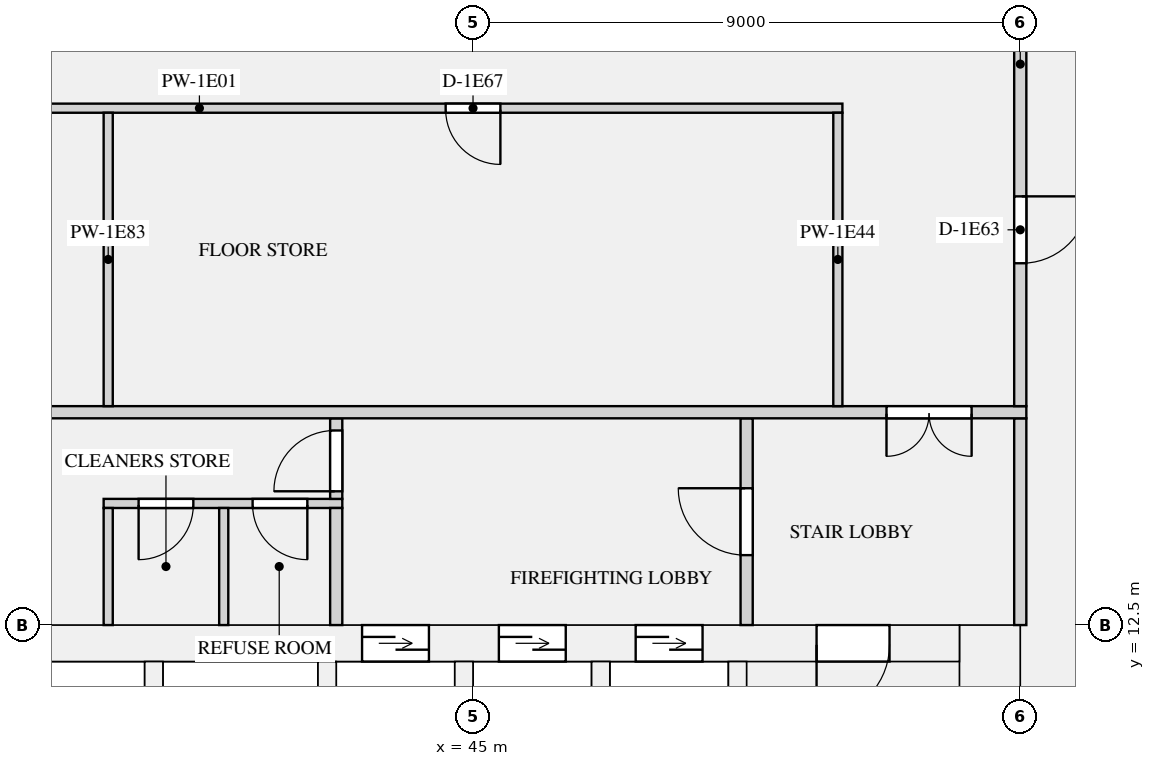
"""IFC4 building model, lengths in metres.
Left out: names, types, materials, properties, quantities, classifications, styles, units other than length and angle.
Written with IfcOpenShell. Run it as: python <this file> out.ifc"""

import sys

from ifc_helpers import new_model, si_unit, direction, frame, frame_2d, origin, place, context, subcontext, project, spatial, rectangle, extrude, element, fill, save


model = new_model("IFC4")
c1 = context("Model", 3, precision=1e-05, world=origin(), true_north=direction((0.0, 1.0)))
c2 = subcontext(c1, "Body", "Model", "MODEL_VIEW")
j1 = project(units=[si_unit("LENGTHUNIT", "METRE"), si_unit("PLANEANGLEUNIT", "RADIAN")], contexts=[c1])
p1 = place(None, origin())
s1 = spatial("IfcSite", under=j1, at=p1, CompositionType="ELEMENT")
p2 = place(p1, origin())
s2 = spatial("IfcBuilding", under=s1, at=p2, CompositionType="ELEMENT")
p3 = place(p2, frame((0.0, 0.0, 54.15)))
s3 = spatial("IfcBuildingStorey", under=s2, at=p3, CompositionType="ELEMENT", Elevation=54.15)
p4 = place(p3, frame((53.5, 0.0, 0.0), z_axis=(0.0, 0.0, 1.0), x_axis=(0.0, 1.0, 0.0)))
e1 = element("IfcWall", 1, at=p4, inside=s3, PredefinedType="SHEAR", context=c2, shape_type="SweptSolid", body=[
    extrude(rectangle(XDim=12.5, YDim=1.0, at=frame_2d((6.25, 0.0))), origin(), (0.0, 0.0, 1.0), 3.15),
])
p5 = place(p3, frame((19.0, 12.2, 0.0), z_axis=(0.0, 0.0, 1.0), x_axis=(1.0, 0.0, 0.0)))
e2 = element("IfcWall", 2, at=p5, inside=s3, PredefinedType="SHEAR", context=c2, shape_type="SweptSolid", body=[
    extrude(rectangle(XDim=34.0, YDim=0.6, at=frame_2d((17.0, 0.0))), origin(), (0.0, 0.0, 1.0), 3.15),
])
p6 = place(p5, frame((4.475, 0.0, 0.0)))
e3 = element("IfcOpeningElement", 3, at=p6, cuts=e2, PredefinedType="OPENING", context=c2, shape_type="SweptSolid", body=[
    extrude(rectangle(XDim=1.2, YDim=2.1, at=frame_2d((0.6, 1.05))), frame((0.0, 0.31, 0.0), z_axis=(0.0, -1.0, 0.0), x_axis=(1.0, 0.0, 0.0)), (0.0, 0.0, 1.0), 0.62),
])
p7 = place(p5, frame((7.325, 0.0, 0.0)))
e4 = element("IfcOpeningElement", 4, at=p7, cuts=e2, PredefinedType="OPENING", context=c2, shape_type="SweptSolid", body=[
    extrude(rectangle(XDim=1.2, YDim=2.1, at=frame_2d((0.6, 1.05))), frame((0.0, 0.31, 0.0), z_axis=(0.0, -1.0, 0.0), x_axis=(1.0, 0.0, 0.0)), (0.0, 0.0, 1.0), 0.62),
])
p8 = place(p5, frame((10.175, 0.0, 0.0)))
e5 = element("IfcOpeningElement", 5, at=p8, cuts=e2, PredefinedType="OPENING", context=c2, shape_type="SweptSolid", body=[
    extrude(rectangle(XDim=1.2, YDim=2.1, at=frame_2d((0.6, 1.05))), frame((0.0, 0.31, 0.0), z_axis=(0.0, -1.0, 0.0), x_axis=(1.0, 0.0, 0.0)), (0.0, 0.0, 1.0), 0.62),
])
p9 = place(p5, frame((13.025, 0.0, 0.0)))
e6 = element("IfcOpeningElement", 6, at=p9, cuts=e2, PredefinedType="OPENING", context=c2, shape_type="SweptSolid", body=[
    extrude(rectangle(XDim=1.2, YDim=2.1, at=frame_2d((0.6, 1.05))), frame((0.0, 0.31, 0.0), z_axis=(0.0, -1.0, 0.0), x_axis=(1.0, 0.0, 0.0)), (0.0, 0.0, 1.0), 0.62),
])
p10 = place(p5, frame((15.875, 0.0, 0.0)))
e7 = element("IfcOpeningElement", 7, at=p10, cuts=e2, PredefinedType="OPENING", context=c2, shape_type="SweptSolid", body=[
    extrude(rectangle(XDim=1.2, YDim=2.1, at=frame_2d((0.6, 1.05))), frame((0.0, 0.31, 0.0), z_axis=(0.0, -1.0, 0.0), x_axis=(1.0, 0.0, 0.0)), (0.0, 0.0, 1.0), 0.62),
])
p11 = place(p5, frame((24.175, 0.0, 0.0)))
e8 = element("IfcOpeningElement", 8, at=p11, cuts=e2, PredefinedType="OPENING", context=c2, shape_type="SweptSolid", body=[
    extrude(rectangle(XDim=1.1, YDim=2.1, at=frame_2d((0.55, 1.05))), frame((0.0, 0.31, 0.0), z_axis=(0.0, -1.0, 0.0), x_axis=(1.0, 0.0, 0.0)), (0.0, 0.0, 1.0), 0.62),
])
p12 = place(p5, frame((26.425, 0.0, 0.0)))
e9 = element("IfcOpeningElement", 9, at=p12, cuts=e2, PredefinedType="OPENING", context=c2, shape_type="SweptSolid", body=[
    extrude(rectangle(XDim=1.1, YDim=2.1, at=frame_2d((0.55, 1.05))), frame((0.0, 0.31, 0.0), z_axis=(0.0, -1.0, 0.0), x_axis=(1.0, 0.0, 0.0)), (0.0, 0.0, 1.0), 0.62),
])
p13 = place(p5, frame((28.675, 0.0, 0.0)))
e10 = element("IfcOpeningElement", 10, at=p13, cuts=e2, PredefinedType="OPENING", context=c2, shape_type="SweptSolid", body=[
    extrude(rectangle(XDim=1.1, YDim=2.1, at=frame_2d((0.55, 1.05))), frame((0.0, 0.31, 0.0), z_axis=(0.0, -1.0, 0.0), x_axis=(1.0, 0.0, 0.0)), (0.0, 0.0, 1.0), 0.62),
])
p14 = place(p5, frame((1.15, 0.0, 0.0)))
e11 = element("IfcOpeningElement", 11, at=p14, cuts=e2, PredefinedType="OPENING", context=c2, shape_type="SweptSolid", body=[
    extrude(rectangle(XDim=1.2, YDim=2.1, at=frame_2d((0.6, 1.05))), frame((0.0, 0.31, 0.0), z_axis=(0.0, -1.0, 0.0), x_axis=(1.0, 0.0, 0.0)), (0.0, 0.0, 1.0), 0.62),
])
p15 = place(p5, frame((31.65, 0.0, 0.0)))
e12 = element("IfcOpeningElement", 12, at=p15, cuts=e2, PredefinedType="OPENING", context=c2, shape_type="SweptSolid", body=[
    extrude(rectangle(XDim=1.2, YDim=2.1, at=frame_2d((0.6, 1.05))), frame((0.0, 0.31, 0.0), z_axis=(0.0, -1.0, 0.0), x_axis=(1.0, 0.0, 0.0)), (0.0, 0.0, 1.0), 0.62),
])
p16 = place(p3, frame((39.75, 9.35, 0.0), z_axis=(0.0, 0.0, 1.0), x_axis=(0.0, 1.0, 0.0)))
e13 = element("IfcWall", 13, at=p16, inside=s3, PredefinedType="SHEAR", context=c2, shape_type="SweptSolid", body=[
    extrude(rectangle(XDim=2.55, YDim=0.3, at=frame_2d((1.275, 0.0))), origin(), (0.0, 0.0, 1.0), 3.15),
])
for number, where, z_axis, x_axis in (
    (14, (42.6, 8.25, 0.0), (0.0, 0.0, 1.0), (0.0, 1.0, 0.0)),
    (15, (44.85, 8.25, 0.0), (0.0, 0.0, 1.0), (0.0, 1.0, 0.0)),
    (16, (47.1, 8.25, 0.0), (0.0, 0.0, 1.0), (0.0, 1.0, 0.0)),
    (17, (49.35, 8.25, 0.0), (0.0, 0.0, 1.0), (0.0, 1.0, 0.0)),
):
    element("IfcWall", number, at=place(p3, frame(where, z_axis=z_axis, x_axis=x_axis)), inside=s3, PredefinedType="SHEAR", context=c2, shape_type="SweptSolid", body=[
        extrude(rectangle(XDim=3.65, YDim=0.3, at=frame_2d((1.825, 0.0))), origin(), (0.0, 0.0, 1.0), 3.15),
    ])
p17 = place(p3, frame((38.925, 14.5, 0.0), z_axis=(0.0, 0.0, 1.0), x_axis=(1.0, 0.0, 0.0)))
e18 = element("IfcWall", 18, at=p17, inside=s3, PredefinedType="PARTITIONING", context=c2, shape_type="SweptSolid", body=[
    extrude(rectangle(XDim=3.925, YDim=0.15, at=frame_2d((1.962, 0.0))), origin(), (0.0, 0.0, 1.0), 2.83),
])
p18 = place(p17, frame((0.575, 0.0, 0.0)))
e19 = element("IfcOpeningElement", 19, at=p18, cuts=e18, PredefinedType="OPENING", context=c2, shape_type="SweptSolid", body=[
    extrude(rectangle(XDim=0.9, YDim=2.1, at=frame_2d((0.45, 1.05))), frame((0.0, 0.085, 0.0), z_axis=(0.0, -1.0, 0.0), x_axis=(1.0, 0.0, 0.0)), (0.0, 0.0, 1.0), 0.17),
])
p19 = place(p17, frame((2.45, 0.0, 0.0)))
e20 = element("IfcOpeningElement", 20, at=p19, cuts=e18, PredefinedType="OPENING", context=c2, shape_type="SweptSolid", body=[
    extrude(rectangle(XDim=0.9, YDim=2.1, at=frame_2d((0.45, 1.05))), frame((0.0, 0.085, 0.0), z_axis=(0.0, -1.0, 0.0), x_axis=(1.0, 0.0, 0.0)), (0.0, 0.0, 1.0), 0.17),
])
for number, where, z_axis, x_axis in (
    (21, (39.0, 12.5, 0.0), (0.0, 0.0, 1.0), (0.0, 1.0, 0.0)),
    (22, (40.9, 12.5, 0.0), (0.0, 0.0, 1.0), (0.0, 1.0, 0.0)),
):
    element("IfcWall", number, at=place(p3, frame(where, z_axis=z_axis, x_axis=x_axis)), inside=s3, PredefinedType="PARTITIONING", context=c2, shape_type="SweptSolid", body=[
        extrude(rectangle(XDim=1.925, YDim=0.15, at=frame_2d((0.962, 0.0))), origin(), (0.0, 0.0, 1.0), 2.83),
    ])
p20 = place(p3, frame((42.75, 12.5, 0.0), z_axis=(0.0, 0.0, 1.0), x_axis=(0.0, 1.0, 0.0)))
e23 = element("IfcWall", 23, at=p20, inside=s3, PredefinedType="PARTITIONING", context=c2, shape_type="SweptSolid", body=[
    extrude(rectangle(XDim=1.925, YDim=0.2, at=frame_2d((0.962, 0.0))), origin(), (0.0, 0.0, 1.0), 2.83),
])
p21 = place(p3, frame((49.5, 12.5, 0.0), z_axis=(0.0, 0.0, 1.0), x_axis=(0.0, 1.0, 0.0)))
e24 = element("IfcWall", 24, at=p21, inside=s3, PredefinedType="PARTITIONING", context=c2, shape_type="SweptSolid", body=[
    extrude(rectangle(XDim=3.4, YDim=0.2, at=frame_2d((1.7, 0.0))), origin(), (0.0, 0.0, 1.0), 2.83),
])
p22 = place(p21, frame((1.15, 0.0, 0.0)))
e25 = element("IfcOpeningElement", 25, at=p22, cuts=e24, PredefinedType="OPENING", context=c2, shape_type="SweptSolid", body=[
    extrude(rectangle(XDim=1.1, YDim=2.1, at=frame_2d((0.55, 1.05))), frame((0.0, 0.11, 0.0), z_axis=(0.0, -1.0, 0.0), x_axis=(1.0, 0.0, 0.0)), (0.0, 0.0, 1.0), 0.22),
])
p23 = place(p3, frame((54.0, 12.5, 0.0), z_axis=(0.0, 0.0, 1.0), x_axis=(0.0, 1.0, 0.0)))
e26 = element("IfcWall", 26, at=p23, inside=s3, PredefinedType="PARTITIONING", context=c2, shape_type="SweptSolid", body=[
    extrude(rectangle(XDim=3.4, YDim=0.2, at=frame_2d((1.7, 0.0))), origin(), (0.0, 0.0, 1.0), 2.83),
])
p24 = place(p3, frame((42.75, 14.575, 0.0), z_axis=(0.0, 0.0, 1.0), x_axis=(0.0, 1.0, 0.0)))
e27 = element("IfcWall", 27, at=p24, inside=s3, PredefinedType="PARTITIONING", context=c2, shape_type="SweptSolid", body=[
    extrude(rectangle(XDim=1.325, YDim=0.2, at=frame_2d((0.663, 0.0))), origin(), (0.0, 0.0, 1.0), 2.83),
])
p25 = place(p24, frame((0.125, 0.0, 0.0)))
e28 = element("IfcOpeningElement", 28, at=p25, cuts=e27, PredefinedType="OPENING", context=c2, shape_type="SweptSolid", body=[
    extrude(rectangle(XDim=1.0, YDim=2.1, at=frame_2d((0.5, 1.05))), frame((0.0, 0.11, 0.0), z_axis=(0.0, -1.0, 0.0), x_axis=(1.0, 0.0, 0.0)), (0.0, 0.0, 1.0), 0.22),
])
p26 = place(p3, frame((20.925, 21.0, 0.0), z_axis=(0.0, 0.0, 1.0), x_axis=(1.0, 0.0, 0.0)))
e29 = element("IfcWall", 29, at=p26, inside=s3, PredefinedType="PARTITIONING", context=c2, shape_type="SweptSolid", body=[
    extrude(rectangle(XDim=30.15, YDim=0.15, at=frame_2d((15.075, 0.0))), origin(), (0.0, 0.0, 1.0), 2.83),
])
p27 = place(p26, frame((7.875, 0.0, 0.0)))
e30 = element("IfcOpeningElement", 30, at=p27, cuts=e29, PredefinedType="OPENING", context=c2, shape_type="SweptSolid", body=[
    extrude(rectangle(XDim=0.9, YDim=2.1, at=frame_2d((0.45, 1.05))), frame((0.0, 0.085, 0.0), z_axis=(0.0, -1.0, 0.0), x_axis=(1.0, 0.0, 0.0)), (0.0, 0.0, 1.0), 0.17),
])
p28 = place(p26, frame((14.625, 0.0, 0.0)))
e31 = element("IfcOpeningElement", 31, at=p28, cuts=e29, PredefinedType="OPENING", context=c2, shape_type="SweptSolid", body=[
    extrude(rectangle(XDim=0.9, YDim=2.1, at=frame_2d((0.45, 1.05))), frame((0.0, 0.085, 0.0), z_axis=(0.0, -1.0, 0.0), x_axis=(1.0, 0.0, 0.0)), (0.0, 0.0, 1.0), 0.17),
])
p29 = place(p26, frame((23.625, 0.0, 0.0)))
e32 = element("IfcOpeningElement", 32, at=p29, cuts=e29, PredefinedType="OPENING", context=c2, shape_type="SweptSolid", body=[
    extrude(rectangle(XDim=0.9, YDim=2.1, at=frame_2d((0.45, 1.05))), frame((0.0, 0.085, 0.0), z_axis=(0.0, -1.0, 0.0), x_axis=(1.0, 0.0, 0.0)), (0.0, 0.0, 1.0), 0.17),
])
p30 = place(p3, frame((17.9, 16.0, 0.0), z_axis=(0.0, 0.0, 1.0), x_axis=(1.0, 0.0, 0.0)))
e33 = element("IfcWall", 33, at=p30, inside=s3, PredefinedType="PARTITIONING", context=c2, shape_type="SweptSolid", body=[
    extrude(rectangle(XDim=36.2, YDim=0.2, at=frame_2d((18.1, 0.0))), origin(), (0.0, 0.0, 1.0), 2.83),
])
p31 = place(p30, frame((0.9, 0.0, 0.0)))
e34 = element("IfcOpeningElement", 34, at=p31, cuts=e33, PredefinedType="OPENING", context=c2, shape_type="SweptSolid", body=[
    extrude(rectangle(XDim=1.4, YDim=2.1, at=frame_2d((0.7, 1.05))), frame((0.0, 0.11, 0.0), z_axis=(0.0, -1.0, 0.0), x_axis=(1.0, 0.0, 0.0)), (0.0, 0.0, 1.0), 0.22),
])
p32 = place(p30, frame((33.9, 0.0, 0.0)))
e35 = element("IfcOpeningElement", 35, at=p32, cuts=e33, PredefinedType="OPENING", context=c2, shape_type="SweptSolid", body=[
    extrude(rectangle(XDim=1.4, YDim=2.1, at=frame_2d((0.7, 1.05))), frame((0.0, 0.11, 0.0), z_axis=(0.0, -1.0, 0.0), x_axis=(1.0, 0.0, 0.0)), (0.0, 0.0, 1.0), 0.22),
])
p33 = place(p3, frame((54.0, 16.1, 0.0), z_axis=(0.0, 0.0, 1.0), x_axis=(0.0, 1.0, 0.0)))
e36 = element("IfcWall", 36, at=p33, inside=s3, PredefinedType="PARTITIONING", context=c2, shape_type="SweptSolid", body=[
    extrude(rectangle(XDim=7.8, YDim=0.2, at=frame_2d((3.9, 0.0))), origin(), (0.0, 0.0, 1.0), 2.83),
])
p34 = place(p33, frame((2.35, 0.0, 0.0)))
e37 = element("IfcOpeningElement", 37, at=p34, cuts=e36, PredefinedType="OPENING", context=c2, shape_type="SweptSolid", body=[
    extrude(rectangle(XDim=1.1, YDim=2.1, at=frame_2d((0.55, 1.05))), frame((0.0, 0.11, 0.0), z_axis=(0.0, -1.0, 0.0), x_axis=(1.0, 0.0, 0.0)), (0.0, 0.0, 1.0), 0.22),
])
for number, where, z_axis, x_axis in (
    (38, (51.0, 16.1, 0.0), (0.0, 0.0, 1.0), (0.0, 1.0, 0.0)),
    (39, (39.0, 16.1, 0.0), (0.0, 0.0, 1.0), (0.0, 1.0, 0.0)),
):
    element("IfcWall", number, at=place(p3, frame(where, z_axis=z_axis, x_axis=x_axis)), inside=s3, PredefinedType="PARTITIONING", context=c2, shape_type="SweptSolid", body=[
        extrude(rectangle(XDim=4.825, YDim=0.15, at=frame_2d((2.413, 0.0))), origin(), (0.0, 0.0, 1.0), 2.83),
    ])
p35 = place(p11, origin())
e40 = element("IfcDoor", 40, at=p35, inside=s3, OperationType="DOUBLE_DOOR_SLIDING", PredefinedType="DOOR", context=c2, shape_type="SweptSolid", body=[
    extrude(rectangle(XDim=1.1, YDim=2.1, at=frame_2d((0.55, 1.05))), frame((0.0, 0.025, 0.0), z_axis=(0.0, -1.0, 0.0), x_axis=(1.0, 0.0, 0.0)), (0.0, 0.0, 1.0), 0.05),
])
fill(e8, e40)
p36 = place(p12, origin())
e41 = element("IfcDoor", 41, at=p36, inside=s3, OperationType="DOUBLE_DOOR_SLIDING", PredefinedType="DOOR", context=c2, shape_type="SweptSolid", body=[
    extrude(rectangle(XDim=1.1, YDim=2.1, at=frame_2d((0.55, 1.05))), frame((0.0, 0.025, 0.0), z_axis=(0.0, -1.0, 0.0), x_axis=(1.0, 0.0, 0.0)), (0.0, 0.0, 1.0), 0.05),
])
fill(e9, e41)
p37 = place(p13, origin())
e42 = element("IfcDoor", 42, at=p37, inside=s3, OperationType="DOUBLE_DOOR_SLIDING", PredefinedType="DOOR", context=c2, shape_type="SweptSolid", body=[
    extrude(rectangle(XDim=1.1, YDim=2.1, at=frame_2d((0.55, 1.05))), frame((0.0, 0.025, 0.0), z_axis=(0.0, -1.0, 0.0), x_axis=(1.0, 0.0, 0.0)), (0.0, 0.0, 1.0), 0.05),
])
fill(e10, e42)
p38 = place(p18, frame((0.9, 0.0, 0.0), z_axis=(0.0, 0.0, 1.0), x_axis=(-1.0, 0.0, 0.0)))
e43 = element("IfcDoor", 43, at=p38, inside=s3, OperationType="SINGLE_SWING_RIGHT", PredefinedType="DOOR", context=c2, shape_type="SweptSolid", body=[
    extrude(rectangle(XDim=0.9, YDim=2.1, at=frame_2d((0.45, 1.05))), frame((0.0, 0.025, 0.0), z_axis=(0.0, -1.0, 0.0), x_axis=(1.0, 0.0, 0.0)), (0.0, 0.0, 1.0), 0.05),
])
fill(e19, e43)
p39 = place(p19, frame((0.9, 0.0, 0.0), z_axis=(0.0, 0.0, 1.0), x_axis=(-1.0, 0.0, 0.0)))
e44 = element("IfcDoor", 44, at=p39, inside=s3, OperationType="SINGLE_SWING_LEFT", PredefinedType="DOOR", context=c2, shape_type="SweptSolid", body=[
    extrude(rectangle(XDim=0.9, YDim=2.1, at=frame_2d((0.45, 1.05))), frame((0.0, 0.025, 0.0), z_axis=(0.0, -1.0, 0.0), x_axis=(1.0, 0.0, 0.0)), (0.0, 0.0, 1.0), 0.05),
])
fill(e20, e44)
p40 = place(p15, frame((1.2, 0.0, 0.0), z_axis=(0.0, 0.0, 1.0), x_axis=(-1.0, 0.0, 0.0)))
e45 = element("IfcDoor", 45, at=p40, inside=s3, OperationType="SINGLE_SWING_RIGHT", PredefinedType="DOOR", context=c2, shape_type="SweptSolid", body=[
    extrude(rectangle(XDim=1.2, YDim=2.1, at=frame_2d((0.6, 1.05))), frame((0.0, 0.025, 0.0), z_axis=(0.0, -1.0, 0.0), x_axis=(1.0, 0.0, 0.0)), (0.0, 0.0, 1.0), 0.05),
])
fill(e12, e45)
p41 = place(p25, origin())
e46 = element("IfcDoor", 46, at=p41, inside=s3, OperationType="SINGLE_SWING_LEFT", PredefinedType="DOOR", context=c2, shape_type="SweptSolid", body=[
    extrude(rectangle(XDim=1.0, YDim=2.1, at=frame_2d((0.5, 1.05))), frame((0.0, 0.025, 0.0), z_axis=(0.0, -1.0, 0.0), x_axis=(1.0, 0.0, 0.0)), (0.0, 0.0, 1.0), 0.05),
])
fill(e28, e46)
p42 = place(p22, origin())
e47 = element("IfcDoor", 47, at=p42, inside=s3, OperationType="SINGLE_SWING_RIGHT", PredefinedType="DOOR", context=c2, shape_type="SweptSolid", body=[
    extrude(rectangle(XDim=1.1, YDim=2.1, at=frame_2d((0.55, 1.05))), frame((0.0, 0.025, 0.0), z_axis=(0.0, -1.0, 0.0), x_axis=(1.0, 0.0, 0.0)), (0.0, 0.0, 1.0), 0.05),
])
fill(e25, e47)
p43 = place(p32, frame((1.4, 0.0, 0.0), z_axis=(0.0, 0.0, 1.0), x_axis=(-1.0, 0.0, 0.0)))
e48 = element("IfcDoor", 48, at=p43, inside=s3, OperationType="DOUBLE_DOOR_SINGLE_SWING", PredefinedType="DOOR", context=c2, shape_type="SweptSolid", body=[
    extrude(rectangle(XDim=1.4, YDim=2.1, at=frame_2d((0.7, 1.05))), frame((0.0, 0.025, 0.0), z_axis=(0.0, -1.0, 0.0), x_axis=(1.0, 0.0, 0.0)), (0.0, 0.0, 1.0), 0.05),
])
fill(e35, e48)
p44 = place(p34, frame((1.1, 0.0, 0.0), z_axis=(0.0, 0.0, 1.0), x_axis=(-1.0, 0.0, 0.0)))
e49 = element("IfcDoor", 49, at=p44, inside=s3, OperationType="SINGLE_SWING_LEFT", PredefinedType="DOOR", context=c2, shape_type="SweptSolid", body=[
    extrude(rectangle(XDim=1.1, YDim=2.1, at=frame_2d((0.55, 1.05))), frame((0.0, 0.025, 0.0), z_axis=(0.0, -1.0, 0.0), x_axis=(1.0, 0.0, 0.0)), (0.0, 0.0, 1.0), 0.05),
])
fill(e37, e49)
p45 = place(p29, frame((0.9, 0.0, 0.0), z_axis=(0.0, 0.0, 1.0), x_axis=(-1.0, 0.0, 0.0)))
e50 = element("IfcDoor", 50, at=p45, inside=s3, OperationType="SINGLE_SWING_LEFT", PredefinedType="DOOR", context=c2, shape_type="SweptSolid", body=[
    extrude(rectangle(XDim=0.9, YDim=2.1, at=frame_2d((0.45, 1.05))), frame((0.0, 0.025, 0.0), z_axis=(0.0, -1.0, 0.0), x_axis=(1.0, 0.0, 0.0)), (0.0, 0.0, 1.0), 0.05),
])
fill(e32, e50)
save(model, sys.argv[1])
